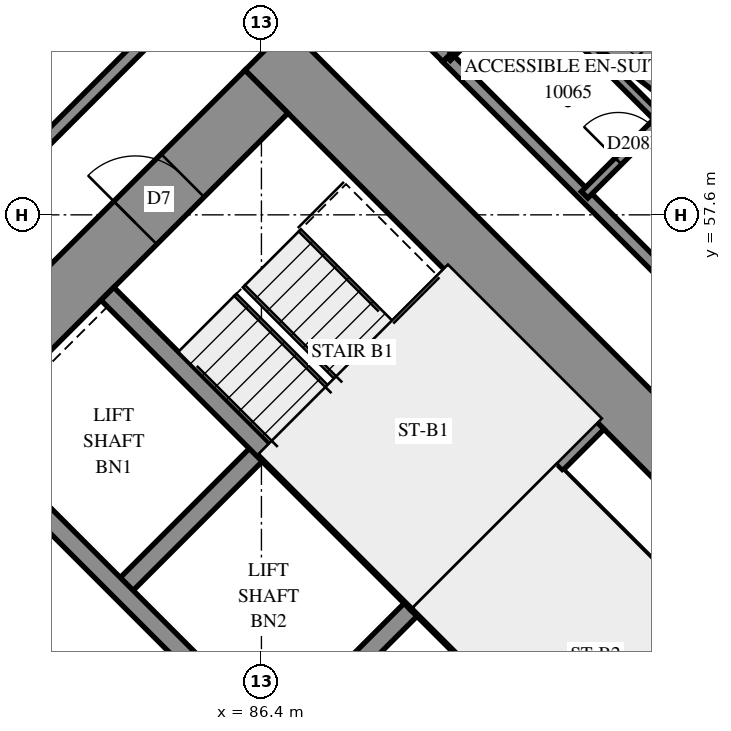
"""IFC4 building model, lengths in metres.
Left out: names, types, materials, properties, quantities, classifications, styles, units other than length and angle.
Written with IfcOpenShell. Run it as: python <this file> out.ifc"""

import sys

from ifc_helpers import new_model, si_unit, direction, frame, frame_2d, origin, place, context, subcontext, project, spatial, polyline, rectangle, outline, extrude, element, fill, save


model = new_model("IFC4")
c1 = context("Model", 3, precision=1e-05, world=origin(), true_north=direction((0.0, 1.0)))
c2 = subcontext(c1, "Body", "Model", "MODEL_VIEW")
j1 = project(units=[si_unit("LENGTHUNIT", "METRE"), si_unit("PLANEANGLEUNIT", "RADIAN")], contexts=[c1])
p1 = place(None, origin())
s1 = spatial("IfcSite", under=j1, at=p1, CompositionType="ELEMENT")
p2 = place(p1, origin())
s2 = spatial("IfcBuilding", under=s1, at=p2, CompositionType="ELEMENT")
p3 = place(p2, frame((0.0, 0.0, 40.6)))
s3 = spatial("IfcBuildingStorey", under=s2, at=p3, CompositionType="ELEMENT", Elevation=40.6)
p4 = place(p3, frame((86.483, 60.333, -0.3), z_axis=(0.0, 0.0, 1.0), x_axis=(0.70710983, -0.7071037324, 0.0)))
e1 = element("IfcWall", 1, at=p4, inside=s3, PredefinedType="SHEAR", context=c2, shape_type="SweptSolid", body=[
    extrude(rectangle(XDim=16.4, YDim=1.0, at=frame_2d((8.2, 0.0))), origin(), (0.0, 0.0, 1.0), 2.7),
])
p5 = place(p4, frame((11.0, 0.0, 0.3)))
e2 = element("IfcOpeningElement", 2, at=p5, cuts=e1, PredefinedType="OPENING", context=c2, shape_type="SweptSolid", body=[
    extrude(rectangle(XDim=0.8, YDim=2.1, at=frame_2d((0.4, 1.05))), frame((0.0, 0.51, 0.0), z_axis=(0.0, -1.0, 0.0), x_axis=(1.0, 0.0, 0.0)), (0.0, 0.0, 1.0), 1.02),
])
p6 = place(p3, frame((76.301, 49.443, -0.3), z_axis=(0.0, 0.0, 1.0), x_axis=(0.7071067812, 0.7071067812, 0.0)))
e3 = element("IfcWall", 3, at=p6, inside=s3, PredefinedType="SHEAR", context=c2, shape_type="SweptSolid", body=[
    extrude(rectangle(XDim=14.4, YDim=1.0, at=frame_2d((7.2, 0.0))), origin(), (0.0, 0.0, 1.0), 2.7),
])
p7 = place(p6, frame((4.55, 0.0, 0.3)))
e4 = element("IfcOpeningElement", 4, at=p7, cuts=e3, PredefinedType="OPENING", context=c2, shape_type="SweptSolid", body=[
    extrude(rectangle(XDim=1.1, YDim=2.1, at=frame_2d((0.55, 1.05))), frame((0.0, 0.51, 0.0), z_axis=(0.0, -1.0, 0.0), x_axis=(1.0, 0.0, 0.0)), (0.0, 0.0, 1.0), 1.02),
])
p8 = place(p6, frame((11.35, 0.0, 0.3)))
e5 = element("IfcOpeningElement", 5, at=p8, cuts=e3, PredefinedType="OPENING", context=c2, shape_type="SweptSolid", body=[
    extrude(rectangle(XDim=1.1, YDim=2.1, at=frame_2d((0.55, 1.05))), frame((0.0, 0.51, 0.0), z_axis=(0.0, -1.0, 0.0), x_axis=(1.0, 0.0, 0.0)), (0.0, 0.0, 1.0), 1.02),
])
p9 = place(p3, frame((84.079, 51.423, 0.0), z_axis=(0.0, 0.0, 1.0), x_axis=(0.7071219326, 0.7070916295, 0.0)))
e6 = element("IfcWall", 6, at=p9, inside=s3, PredefinedType="SOLIDWALL", context=c2, shape_type="SweptSolid", body=[
    extrude(rectangle(XDim=3.3, YDim=0.3, at=frame_2d((1.65, 0.0))), origin(), (0.0, 0.0, 1.0), 3.1),
])
p10 = place(p3, frame((86.625, 48.878, 0.0), z_axis=(0.0, 0.0, 1.0), x_axis=(0.7071067812, 0.7071067812, 0.0)))
e7 = element("IfcWall", 7, at=p10, inside=s3, PredefinedType="SOLIDWALL", context=c2, shape_type="SweptSolid", body=[
    extrude(rectangle(XDim=3.3, YDim=0.3, at=frame_2d((1.65, 0.0))), origin(), (0.0, 0.0, 1.0), 3.1),
])
p11 = place(p3, frame((78.988, 51.423, 0.0), z_axis=(0.0, 0.0, 1.0), x_axis=(0.7071067812, -0.7071067812, 0.0)))
e8 = element("IfcWall", 8, at=p11, inside=s3, PredefinedType="SOLIDWALL", context=c2, shape_type="SweptSolid", body=[
    extrude(rectangle(XDim=14.4, YDim=0.3, at=frame_2d((7.2, 0.0))), origin(), (0.0, 0.0, 1.0), 3.1),
])
p12 = place(p11, frame((1.25, 0.0, 0.0)))
e9 = element("IfcOpeningElement", 9, at=p12, cuts=e8, PredefinedType="OPENING", context=c2, shape_type="SweptSolid", body=[
    extrude(rectangle(XDim=1.1, YDim=2.1, at=frame_2d((0.55, 1.05))), frame((0.0, 0.16, 0.0), z_axis=(0.0, -1.0, 0.0), x_axis=(1.0, 0.0, 0.0)), (0.0, 0.0, 1.0), 0.32),
])
p13 = place(p11, frame((4.85, 0.0, 0.0)))
e10 = element("IfcOpeningElement", 10, at=p13, cuts=e8, PredefinedType="OPENING", context=c2, shape_type="SweptSolid", body=[
    extrude(rectangle(XDim=1.1, YDim=2.1, at=frame_2d((0.55, 1.05))), frame((0.0, 0.16, 0.0), z_axis=(0.0, -1.0, 0.0), x_axis=(1.0, 0.0, 0.0)), (0.0, 0.0, 1.0), 0.32),
])
p14 = place(p11, frame((8.45, 0.0, 0.0)))
e11 = element("IfcOpeningElement", 11, at=p14, cuts=e8, PredefinedType="OPENING", context=c2, shape_type="SweptSolid", body=[
    extrude(rectangle(XDim=1.1, YDim=2.1, at=frame_2d((0.55, 1.05))), frame((0.0, 0.16, 0.0), z_axis=(0.0, -1.0, 0.0), x_axis=(1.0, 0.0, 0.0)), (0.0, 0.0, 1.0), 0.32),
])
p15 = place(p11, frame((12.05, 0.0, 0.0)))
e12 = element("IfcOpeningElement", 12, at=p15, cuts=e8, PredefinedType="OPENING", context=c2, shape_type="SweptSolid", body=[
    extrude(rectangle(XDim=1.1, YDim=2.1, at=frame_2d((0.55, 1.05))), frame((0.0, 0.16, 0.0), z_axis=(0.0, -1.0, 0.0), x_axis=(1.0, 0.0, 0.0)), (0.0, 0.0, 1.0), 0.32),
])
p16 = place(p3, frame((81.534, 53.969, 0.0), z_axis=(0.0, 0.0, 1.0), x_axis=(0.707103309, -0.7071102534, 0.0)))
e13 = element("IfcWall", 13, at=p16, inside=s3, PredefinedType="SOLIDWALL", context=c2, shape_type="SweptSolid", body=[
    extrude(rectangle(XDim=14.4, YDim=0.3, at=frame_2d((7.2, 0.0))), origin(), (0.0, 0.0, 1.0), 3.1),
])
p17 = place(p16, frame((12.05, 0.0, 0.0)))
e14 = element("IfcOpeningElement", 14, at=p17, cuts=e13, PredefinedType="OPENING", context=c2, shape_type="SweptSolid", body=[
    extrude(rectangle(XDim=1.1, YDim=2.1, at=frame_2d((0.55, 1.05))), frame((0.0, 0.16, 0.0), z_axis=(0.0, -1.0, 0.0), x_axis=(1.0, 0.0, 0.0)), (0.0, 0.0, 1.0), 0.32),
])
for number, where, z_axis, x_axis in (
    (15, (83.867, 56.302, 0.0), (0.0, 0.0, 1.0), (0.707, -0.707, 0.0)),
    (16, (88.958, 51.211, 0.0), (0.0, 0.0, 1.0), (0.707, -0.707, 0.0)),
):
    element("IfcWall", number, at=place(p3, frame(where, z_axis=z_axis, x_axis=x_axis)), inside=s3, PredefinedType="SOLIDWALL", context=c2, shape_type="SweptSolid", body=[
        extrude(rectangle(XDim=7.2, YDim=0.3, at=frame_2d((3.6, 0.0))), origin(), (0.0, 0.0, 1.0), 3.1),
    ])
p18 = place(p3, frame((88.958, 51.211, 0.0), z_axis=(0.0, 0.0, 1.0), x_axis=(0.7071067812, 0.7071067812, 0.0)))
e17 = element("IfcWall", 17, at=p18, inside=s3, PredefinedType="SOLIDWALL", context=c2, shape_type="SweptSolid", body=[
    extrude(rectangle(XDim=4.2, YDim=0.3, at=frame_2d((2.1, 0.0))), origin(), (0.0, 0.0, 1.0), 3.1),
])
p19 = place(p3, frame((94.063, 59.038, 0.0), z_axis=(0.0, 0.0, 1.0), x_axis=(-0.787944141, 0.6157467261, 0.0)))
e18 = element("IfcWall", 18, at=p19, inside=s3, PredefinedType="SOLIDWALL", context=c2, shape_type="SweptSolid", body=[
    extrude(outline(polyline([(-0.034, -0.275), (3.425, -0.275), (3.492, 0.275), (0.034, 0.275), (-0.034, -0.275)])), origin(), (0.0, 0.0, 1.0), 3.1),
])
p20 = place(p19, frame((1.873, 0.0, 0.5)))
e19 = element("IfcOpeningElement", 19, at=p20, cuts=e18, PredefinedType="OPENING", context=c2, shape_type="SweptSolid", body=[
    extrude(rectangle(XDim=1.2, YDim=2.45, at=frame_2d((0.6, 1.225))), frame((0.0, 0.285, 0.0), z_axis=(0.0, -1.0, 0.0), x_axis=(1.0, 0.0, 0.0)), (0.0, 0.0, 1.0), 0.57),
])
p21 = place(p3, frame((91.313, 53.354, 0.0), z_axis=(0.0, 0.0, 1.0), x_axis=(0.7071140275, -0.7070995348, 0.0)))
e20 = element("IfcWall", 20, at=p21, inside=s3, PredefinedType="PARTITIONING", context=c2, shape_type="SweptSolid", body=[
    extrude(rectangle(XDim=6.9, YDim=0.15, at=frame_2d((3.45, 0.0))), origin(), (0.0, 0.0, 1.0), 3.1),
])
p22 = place(p3, frame((79.871, 55.843, 0.0), z_axis=(0.0, 0.0, 1.0), x_axis=(0.7071067812, 0.7071067812, 0.0)))
e21 = element("IfcWall", 21, at=p22, inside=s3, PredefinedType="PARTITIONING", context=c2, shape_type="SweptSolid", body=[
    extrude(rectangle(XDim=9.85, YDim=0.2, at=frame_2d((4.925, 0.0))), origin(), (0.0, 0.0, 1.0), 3.1),
])
p23 = place(p22, frame((1.135, 0.0, 0.0)))
e22 = element("IfcOpeningElement", 22, at=p23, cuts=e21, PredefinedType="OPENING", context=c2, shape_type="SweptSolid", body=[
    extrude(rectangle(XDim=1.0, YDim=2.1, at=frame_2d((0.5, 1.05))), frame((0.0, 0.11, 0.0), z_axis=(0.0, -1.0, 0.0), x_axis=(1.0, 0.0, 0.0)), (0.0, 0.0, 1.0), 0.22),
])
p24 = place(p3, frame((89.451, 60.189, 0.0), z_axis=(0.0, 0.0, 1.0), x_axis=(0.7071796965, -0.7070338583, 0.0)))
e23 = element("IfcWall", 23, at=p24, inside=s3, PredefinedType="PARTITIONING", context=c2, shape_type="SweptSolid", body=[
    extrude(rectangle(XDim=9.6, YDim=0.2, at=frame_2d((4.8, 0.0))), origin(), (0.0, 0.0, 1.0), 3.1),
])
p25 = place(p24, frame((7.315, 0.0, 0.0)))
e24 = element("IfcOpeningElement", 24, at=p25, cuts=e23, PredefinedType="OPENING", context=c2, shape_type="SweptSolid", body=[
    extrude(rectangle(XDim=0.9, YDim=2.1, at=frame_2d((0.45, 1.05))), frame((0.0, 0.11, 0.0), z_axis=(0.0, -1.0, 0.0), x_axis=(1.0, 0.0, 0.0)), (0.0, 0.0, 1.0), 0.22),
])
p26 = place(p3, frame((91.239, 60.888, 0.0), z_axis=(0.0, 0.0, 1.0), x_axis=(0.7071067812, -0.7071067812, 0.0)))
e25 = element("IfcWall", 25, at=p26, inside=s3, PredefinedType="PARTITIONING", context=c2, shape_type="SweptSolid", body=[
    extrude(rectangle(XDim=2.43, YDim=0.15, at=frame_2d((1.215, 0.0))), origin(), (0.0, 0.0, 1.0), 3.1),
])
p27 = place(p3, frame((91.715, 57.929, 0.0), z_axis=(0.0, 0.0, 1.0), x_axis=(0.7071067812, 0.7071067812, 0.0)))
e26 = element("IfcWall", 26, at=p27, inside=s3, PredefinedType="PARTITIONING", context=c2, shape_type="SweptSolid", body=[
    extrude(rectangle(XDim=2.06, YDim=0.15, at=frame_2d((1.03, 0.0))), origin(), (0.0, 0.0, 1.0), 3.1),
])
p28 = place(p27, frame((0.784, 0.0, 0.0)))
e27 = element("IfcOpeningElement", 27, at=p28, cuts=e26, PredefinedType="OPENING", context=c2, shape_type="SweptSolid", body=[
    extrude(rectangle(XDim=0.8, YDim=2.1, at=frame_2d((0.4, 1.05))), frame((0.0, 0.085, 0.0), z_axis=(0.0, -1.0, 0.0), x_axis=(1.0, 0.0, 0.0)), (0.0, 0.0, 1.0), 0.17),
])
p29 = place(p3, frame((89.453, 60.193, 0.0), z_axis=(0.0, 0.0, 1.0), x_axis=(0.7071341975, 0.7070793639, 0.0)))
e28 = element("IfcWall", 28, at=p29, inside=s3, PredefinedType="PARTITIONING", context=c2, shape_type="SweptSolid", body=[
    extrude(rectangle(XDim=1.824, YDim=0.15, at=frame_2d((0.912, 0.0))), origin(), (0.0, 0.0, 1.0), 3.1),
])
p30 = place(p3, frame((88.603, 61.039, 0.0), z_axis=(0.0, 0.0, 1.0), x_axis=(0.7079391603, -0.7062734211, 0.0)))
e29 = element("IfcWall", 29, at=p30, inside=s3, PredefinedType="PARTITIONING", context=c2, shape_type="SweptSolid", body=[
    extrude(rectangle(XDim=1.201, YDim=0.2, at=frame_2d((0.6, 0.0))), origin(), (0.0, 0.0, 1.0), 3.1),
])
p31 = place(p20, origin())
e30 = element("IfcWindow", 30, at=p31, inside=s3, PartitioningType="SINGLE_PANEL", PredefinedType="WINDOW", context=c2, shape_type="SweptSolid", body=[
    extrude(rectangle(XDim=1.2, YDim=2.45, at=frame_2d((0.6, 1.225))), frame((0.0, 0.155, 0.0), z_axis=(0.0, -1.0, 0.0), x_axis=(1.0, 0.0, 0.0)), (0.0, 0.0, 1.0), 0.06),
])
fill(e19, e30)
p32 = place(p8, origin())
e31 = element("IfcDoor", 31, at=p32, inside=s3, OperationType="SINGLE_SWING_LEFT", PredefinedType="DOOR", context=c2, shape_type="SweptSolid", body=[
    extrude(rectangle(XDim=1.1, YDim=2.1, at=frame_2d((0.55, 1.05))), frame((0.0, 0.025, 0.0), z_axis=(0.0, -1.0, 0.0), x_axis=(1.0, 0.0, 0.0)), (0.0, 0.0, 1.0), 0.05),
])
fill(e5, e31)
p33 = place(p28, origin())
e32 = element("IfcDoor", 32, at=p33, inside=s3, OperationType="SINGLE_SWING_RIGHT", PredefinedType="DOOR", context=c2, shape_type="SweptSolid", body=[
    extrude(rectangle(XDim=0.8, YDim=2.1, at=frame_2d((0.4, 1.05))), frame((0.0, 0.025, 0.0), z_axis=(0.0, -1.0, 0.0), x_axis=(1.0, 0.0, 0.0)), (0.0, 0.0, 1.0), 0.05),
])
fill(e27, e32)
save(model, sys.argv[1])
